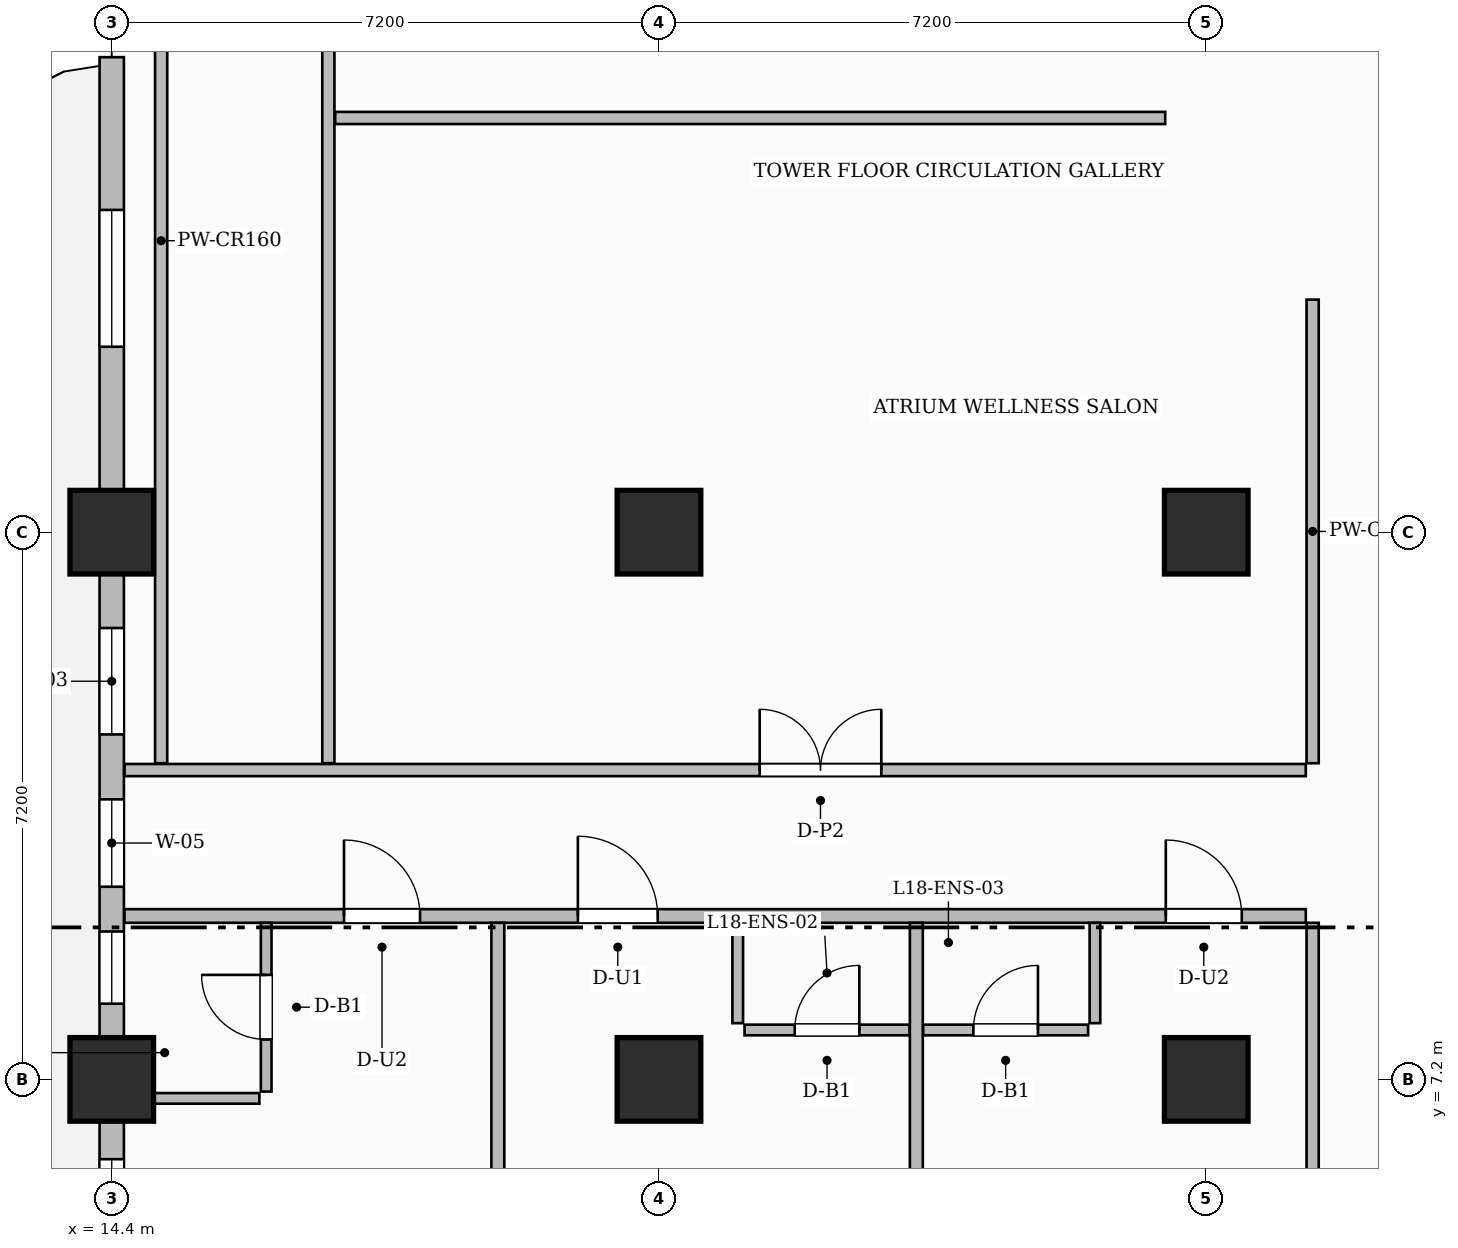
"""IFC4 building model, lengths in metres.
Left out: names, types, materials, properties, quantities, classifications, styles, units other than length and angle.
Written with IfcOpenShell. Run it as: python <this file> out.ifc"""

import sys

from ifc_helpers import new_model, si_unit, direction, frame, frame_2d, origin, origin_2d, place, context, subcontext, project, spatial, rectangle, extrude, source, transform, mapped, element, fill, save


model = new_model("IFC4")
c1 = context("Model", 3, precision=1e-05, world=origin(), true_north=direction((0.0, 1.0)))
c2 = subcontext(c1, "Body", "Model", "MODEL_VIEW")
j1 = project(units=[si_unit("LENGTHUNIT", "METRE"), si_unit("PLANEANGLEUNIT", "RADIAN")], contexts=[c1])
p1 = place(None, origin())
s1 = spatial("IfcSite", under=j1, at=p1, CompositionType="ELEMENT")
p2 = place(p1, origin())
s2 = spatial("IfcBuilding", under=s1, at=p2, CompositionType="ELEMENT")
p3 = place(p2, frame((0.0, 0.0, 76.8)))
s3 = spatial("IfcBuildingStorey", under=s2, at=p3, CompositionType="ELEMENT", Elevation=76.8)
m1 = source(origin(), c2, "Body", "SweptSolid", [
    extrude(rectangle(XDim=1.1, YDim=1.1, at=origin_2d()), origin(), (0.0, 0.0, 1.0), 3.7),
])
for number, where, z_axis, x_axis in (
    (1, (14.4, 7.2, 0.0), (0.0, 0.0, 1.0), (1.0, 0.0, 0.0)),
    (2, (14.4, 14.4, 0.0), (0.0, 0.0, 1.0), (1.0, 0.0, 0.0)),
    (3, (21.6, 7.2, 0.0), (0.0, 0.0, 1.0), (1.0, 0.0, 0.0)),
    (4, (21.6, 14.4, 0.0), (0.0, 0.0, 1.0), (1.0, 0.0, 0.0)),
    (5, (28.8, 7.2, 0.0), (0.0, 0.0, 1.0), (1.0, 0.0, 0.0)),
    (6, (28.8, 14.4, 0.0), (0.0, 0.0, 1.0), (1.0, 0.0, 0.0)),
):
    element("IfcColumn", number, at=place(p3, frame(where, z_axis=z_axis, x_axis=x_axis)), inside=s3, PredefinedType="COLUMN", context=c2, shape_type="MappedRepresentation", body=[
        mapped(m1, transform((0.0, 0.0, 0.0), scale=1.0)),
    ])
p4 = place(p3, frame((14.568, 9.35, 0.0), z_axis=(0.0, 0.0, 1.0), x_axis=(1.0, 0.0, 0.0)))
e7 = element("IfcWall", 7, at=p4, inside=s3, PredefinedType="PARTITIONING", context=c2, shape_type="SweptSolid", body=[
    extrude(rectangle(XDim=15.542, YDim=0.18, at=frame_2d((7.771, 0.0))), origin(), (0.0, 0.0, 1.0), 3.45),
])
p5 = place(p4, frame((2.888, 0.0, 0.0)))
e8 = element("IfcOpeningElement", 8, at=p5, cuts=e7, PredefinedType="OPENING", context=c2, shape_type="SweptSolid", body=[
    extrude(rectangle(XDim=1.0, YDim=2.2, at=frame_2d((0.5, 1.1))), frame((0.0, 0.1, 0.0), z_axis=(0.0, -1.0, 0.0), x_axis=(1.0, 0.0, 0.0)), (0.0, 0.0, 1.0), 0.2),
])
p6 = place(p4, frame((5.965, 0.0, 0.0)))
e9 = element("IfcOpeningElement", 9, at=p6, cuts=e7, PredefinedType="OPENING", context=c2, shape_type="SweptSolid", body=[
    extrude(rectangle(XDim=1.05, YDim=2.25, at=frame_2d((0.525, 1.125))), frame((0.0, 0.1, 0.0), z_axis=(0.0, -1.0, 0.0), x_axis=(1.0, 0.0, 0.0)), (0.0, 0.0, 1.0), 0.2),
])
p7 = place(p4, frame((13.7, 0.0, 0.0)))
e10 = element("IfcOpeningElement", 10, at=p7, cuts=e7, PredefinedType="OPENING", context=c2, shape_type="SweptSolid", body=[
    extrude(rectangle(XDim=1.0, YDim=2.2, at=frame_2d((0.5, 1.1))), frame((0.0, 0.1, 0.0), z_axis=(0.0, -1.0, 0.0), x_axis=(1.0, 0.0, 0.0)), (0.0, 0.0, 1.0), 0.2),
])
p8 = place(p3, frame((14.568, 11.27, 0.0), z_axis=(0.0, 0.0, 1.0), x_axis=(1.0, 0.0, 0.0)))
e11 = element("IfcWall", 11, at=p8, inside=s3, PredefinedType="PARTITIONING", context=c2, shape_type="SweptSolid", body=[
    extrude(rectangle(XDim=15.542, YDim=0.16, at=frame_2d((7.771, 0.0))), origin(), (0.0, 0.0, 1.0), 3.45),
])
p9 = place(p8, frame((8.357, 0.0, 0.0)))
e12 = element("IfcOpeningElement", 12, at=p9, cuts=e11, PredefinedType="OPENING", context=c2, shape_type="SweptSolid", body=[
    extrude(rectangle(XDim=1.6, YDim=2.4, at=frame_2d((0.8, 1.2))), frame((0.0, 0.09, 0.0), z_axis=(0.0, -1.0, 0.0), x_axis=(1.0, 0.0, 0.0)), (0.0, 0.0, 1.0), 0.18),
])
p10 = place(p3, frame((30.2, 11.36, 0.0), z_axis=(0.0, 0.0, 1.0), x_axis=(0.0, 1.0, 0.0)))
e13 = element("IfcWall", 13, at=p10, inside=s3, PredefinedType="PARTITIONING", context=c2, shape_type="SweptSolid", body=[
    extrude(rectangle(XDim=6.1, YDim=0.16, at=frame_2d((3.05, 0.0))), origin(), (0.0, 0.0, 1.0), 3.45),
])
p11 = place(p3, frame((30.2, 0.168, 0.0), z_axis=(0.0, 0.0, 1.0), x_axis=(0.0, 1.0, 0.0)))
e14 = element("IfcWall", 14, at=p11, inside=s3, PredefinedType="PARTITIONING", context=c2, shape_type="SweptSolid", body=[
    extrude(rectangle(XDim=9.092, YDim=0.16, at=frame_2d((4.546, 0.0))), origin(), (0.0, 0.0, 1.0), 3.45),
])
p12 = place(p11, frame((1.957, 0.0, 0.0)))
e15 = element("IfcOpeningElement", 15, at=p12, cuts=e14, PredefinedType="OPENING", context=c2, shape_type="SweptSolid", body=[
    extrude(rectangle(XDim=1.05, YDim=2.15, at=frame_2d((0.525, 1.075))), frame((0.0, 0.09, 0.0), z_axis=(0.0, -1.0, 0.0), x_axis=(1.0, 0.0, 0.0)), (0.0, 0.0, 1.0), 0.18),
])
p13 = place(p3, frame((19.48, 0.168, 0.0), z_axis=(0.0, 0.0, 1.0), x_axis=(0.0, 1.0, 0.0)))
e16 = element("IfcWall", 16, at=p13, inside=s3, PredefinedType="PARTITIONING", context=c2, shape_type="SweptSolid", body=[
    extrude(rectangle(XDim=9.092, YDim=0.17, at=frame_2d((4.546, 0.0))), origin(), (0.0, 0.0, 1.0), 3.45),
])
p14 = place(p3, frame((24.986, 0.168, 0.0), z_axis=(0.0, 0.0, 1.0), x_axis=(0.0, 1.0, 0.0)))
e17 = element("IfcWall", 17, at=p14, inside=s3, PredefinedType="PARTITIONING", context=c2, shape_type="SweptSolid", body=[
    extrude(rectangle(XDim=9.092, YDim=0.17, at=frame_2d((4.546, 0.0))), origin(), (0.0, 0.0, 1.0), 3.075),
])
p15 = place(p3, frame((16.432, 7.04, 0.0), z_axis=(0.0, 0.0, 1.0), x_axis=(0.0, 1.0, 0.0)))
e18 = element("IfcWall", 18, at=p15, inside=s3, PredefinedType="PARTITIONING", context=c2, shape_type="SweptSolid", body=[
    extrude(rectangle(XDim=2.22, YDim=0.14, at=frame_2d((1.11, 0.0))), origin(), (0.0, 0.0, 1.0), 3.45),
])
p16 = place(p15, frame((0.685, 0.0, 0.0)))
e19 = element("IfcOpeningElement", 19, at=p16, cuts=e18, PredefinedType="OPENING", context=c2, shape_type="SweptSolid", body=[
    extrude(rectangle(XDim=0.85, YDim=2.1, at=frame_2d((0.425, 1.05))), frame((0.0, 0.08, 0.0), z_axis=(0.0, -1.0, 0.0), x_axis=(1.0, 0.0, 0.0)), (0.0, 0.0, 1.0), 0.16),
])
p17 = place(p3, frame((14.49, 6.95, 0.0), z_axis=(0.0, 0.0, 1.0), x_axis=(1.0, 0.0, 0.0)))
e20 = element("IfcWall", 20, at=p17, inside=s3, PredefinedType="PARTITIONING", context=c2, shape_type="SweptSolid", body=[
    extrude(rectangle(XDim=1.852, YDim=0.14, at=frame_2d((0.926, 0.0))), origin(), (0.0, 0.0, 1.0), 2.885),
])
p18 = place(p3, frame((22.636, 7.94, 0.0), z_axis=(0.0, 0.0, 1.0), x_axis=(0.0, 1.0, 0.0)))
e21 = element("IfcWall", 21, at=p18, inside=s3, PredefinedType="PARTITIONING", context=c2, shape_type="SweptSolid", body=[
    extrude(rectangle(XDim=1.32, YDim=0.14, at=frame_2d((0.66, 0.0))), origin(), (0.0, 0.0, 1.0), 3.45),
])
p19 = place(p3, frame((22.726, 7.85, 0.0), z_axis=(0.0, 0.0, 1.0), x_axis=(1.0, 0.0, 0.0)))
e22 = element("IfcWall", 22, at=p19, inside=s3, PredefinedType="PARTITIONING", context=c2, shape_type="SweptSolid", body=[
    extrude(rectangle(XDim=2.17, YDim=0.14, at=frame_2d((1.085, 0.0))), origin(), (0.0, 0.0, 1.0), 3.45),
])
p20 = place(p19, frame((0.66, 0.0, 0.0)))
e23 = element("IfcOpeningElement", 23, at=p20, cuts=e22, PredefinedType="OPENING", context=c2, shape_type="SweptSolid", body=[
    extrude(rectangle(XDim=0.85, YDim=2.1, at=frame_2d((0.425, 1.05))), frame((0.0, 0.08, 0.0), z_axis=(0.0, -1.0, 0.0), x_axis=(1.0, 0.0, 0.0)), (0.0, 0.0, 1.0), 0.16),
])
p21 = place(p3, frame((27.336, 7.94, 0.0), z_axis=(0.0, 0.0, 1.0), x_axis=(0.0, 1.0, 0.0)))
e24 = element("IfcWall", 24, at=p21, inside=s3, PredefinedType="PARTITIONING", context=c2, shape_type="SweptSolid", body=[
    extrude(rectangle(XDim=1.32, YDim=0.14, at=frame_2d((0.66, 0.0))), origin(), (0.0, 0.0, 1.0), 3.45),
])
p22 = place(p3, frame((25.076, 7.85, 0.0), z_axis=(0.0, 0.0, 1.0), x_axis=(1.0, 0.0, 0.0)))
e25 = element("IfcWall", 25, at=p22, inside=s3, PredefinedType="PARTITIONING", context=c2, shape_type="SweptSolid", body=[
    extrude(rectangle(XDim=2.17, YDim=0.14, at=frame_2d((1.085, 0.0))), origin(), (0.0, 0.0, 1.0), 3.45),
])
p23 = place(p22, frame((0.66, 0.0, 0.0)))
e26 = element("IfcOpeningElement", 26, at=p23, cuts=e25, PredefinedType="OPENING", context=c2, shape_type="SweptSolid", body=[
    extrude(rectangle(XDim=0.85, YDim=2.1, at=frame_2d((0.425, 1.05))), frame((0.0, 0.08, 0.0), z_axis=(0.0, -1.0, 0.0), x_axis=(1.0, 0.0, 0.0)), (0.0, 0.0, 1.0), 0.16),
])
for number, where, z_axis, x_axis in (
    (27, (15.05, 11.36, 0.0), (0.0, 0.0, 1.0), (0.0, 1.0, 0.0)),
    (28, (17.25, 11.36, 0.0), (0.0, 0.0, 1.0), (0.0, 1.0, 0.0)),
):
    element("IfcWall", number, at=place(p3, frame(where, z_axis=z_axis, x_axis=x_axis)), inside=s3, PredefinedType="PARTITIONING", context=c2, shape_type="SweptSolid", body=[
        extrude(rectangle(XDim=13.75, YDim=0.16, at=frame_2d((6.875, 0.0))), origin(), (0.0, 0.0, 1.0), 3.45),
    ])
p24 = place(p3, frame((17.34, 19.85, 0.0), z_axis=(0.0, 0.0, 1.0), x_axis=(1.0, 0.0, 0.0)))
e29 = element("IfcWall", 29, at=p24, inside=s3, PredefinedType="PARTITIONING", context=c2, shape_type="SweptSolid", body=[
    extrude(rectangle(XDim=10.92, YDim=0.16, at=frame_2d((5.46, 0.0))), origin(), (0.0, 0.0, 1.0), 3.45),
])
p25 = place(p3, frame((14.4, 0.05, 0.0), z_axis=(0.0, 0.0, 1.0), x_axis=(0.0, 1.0, 0.0)))
e30 = element("IfcWall", 30, at=p25, inside=s3, PredefinedType="SOLIDWALL", context=c2, shape_type="SweptSolid", body=[
    extrude(rectangle(XDim=20.6, YDim=0.32, at=frame_2d((10.3, 0.0))), origin(), (0.0, 0.0, 1.0), 2.885),
])
p26 = place(p25, frame((3.4, 0.0, 0.0)))
e31 = element("IfcOpeningElement", 31, at=p26, cuts=e30, PredefinedType="OPENING", context=c2, shape_type="SweptSolid", body=[
    extrude(rectangle(XDim=1.2, YDim=2.2, at=frame_2d((0.6, 1.1))), frame((0.0, 0.17, 0.0), z_axis=(0.0, -1.0, 0.0), x_axis=(1.0, 0.0, 0.0)), (0.0, 0.0, 1.0), 0.34),
])
p27 = place(p25, frame((1.225, 0.0, 0.8)))
e32 = element("IfcOpeningElement", 32, at=p27, cuts=e30, PredefinedType="OPENING", context=c2, shape_type="SweptSolid", body=[
    extrude(rectangle(XDim=1.4, YDim=1.85, at=frame_2d((0.7, 0.925))), frame((0.0, 0.17, 0.0), z_axis=(0.0, -1.0, 0.0), x_axis=(1.0, 0.0, 0.0)), (0.0, 0.0, 1.0), 0.34),
])
p28 = place(p25, frame((5.15, 0.0, 0.8)))
e33 = element("IfcOpeningElement", 33, at=p28, cuts=e30, PredefinedType="OPENING", context=c2, shape_type="SweptSolid", body=[
    extrude(rectangle(XDim=0.95, YDim=1.75, at=frame_2d((0.475, 0.875))), frame((0.0, 0.17, 0.0), z_axis=(0.0, -1.0, 0.0), x_axis=(1.0, 0.0, 0.0)), (0.0, 0.0, 1.0), 0.34),
])
p29 = place(p25, frame((8.146, 0.0, 0.8)))
e34 = element("IfcOpeningElement", 34, at=p29, cuts=e30, PredefinedType="OPENING", context=c2, shape_type="SweptSolid", body=[
    extrude(rectangle(XDim=0.95, YDim=1.75, at=frame_2d((0.475, 0.875))), frame((0.0, 0.17, 0.0), z_axis=(0.0, -1.0, 0.0), x_axis=(1.0, 0.0, 0.0)), (0.0, 0.0, 1.0), 0.34),
])
p30 = place(p25, frame((9.685, 0.0, 0.8)))
e35 = element("IfcOpeningElement", 35, at=p30, cuts=e30, PredefinedType="OPENING", context=c2, shape_type="SweptSolid", body=[
    extrude(rectangle(XDim=1.15, YDim=1.8, at=frame_2d((0.575, 0.9))), frame((0.0, 0.17, 0.0), z_axis=(0.0, -1.0, 0.0), x_axis=(1.0, 0.0, 0.0)), (0.0, 0.0, 1.0), 0.34),
])
p31 = place(p25, frame((11.689, 0.0, 0.8)))
e36 = element("IfcOpeningElement", 36, at=p31, cuts=e30, PredefinedType="OPENING", context=c2, shape_type="SweptSolid", body=[
    extrude(rectangle(XDim=1.4, YDim=1.85, at=frame_2d((0.7, 0.925))), frame((0.0, 0.17, 0.0), z_axis=(0.0, -1.0, 0.0), x_axis=(1.0, 0.0, 0.0)), (0.0, 0.0, 1.0), 0.34),
])
p32 = place(p25, frame((16.79, 0.0, 0.8)))
e37 = element("IfcOpeningElement", 37, at=p32, cuts=e30, PredefinedType="OPENING", context=c2, shape_type="SweptSolid", body=[
    extrude(rectangle(XDim=1.8, YDim=1.85, at=frame_2d((0.9, 0.925))), frame((0.0, 0.17, 0.0), z_axis=(0.0, -1.0, 0.0), x_axis=(1.0, 0.0, 0.0)), (0.0, 0.0, 1.0), 0.34),
])
m2 = source(origin(), c2, "Body", "SweptSolid", [
    extrude(rectangle(XDim=0.85, YDim=2.1, at=frame_2d((0.425, 1.05))), frame((0.0, 0.025, 0.0), z_axis=(0.0, -1.0, 0.0), x_axis=(1.0, 0.0, 0.0)), (0.0, 0.0, 1.0), 0.05),
])
p33 = place(p16, origin())
e38 = element("IfcDoor", 38, at=p33, inside=s3, OperationType="SINGLE_SWING_RIGHT", PredefinedType="DOOR", context=c2, shape_type="MappedRepresentation", body=[
    mapped(m2, transform((0.0, 0.0, 0.0), scale=1.0)),
])
fill(e19, e38)
m3 = source(origin(), c2, "Body", "SweptSolid", [
    extrude(rectangle(XDim=1.0, YDim=2.2, at=frame_2d((0.5, 1.1))), frame((0.0, 0.025, 0.0), z_axis=(0.0, -1.0, 0.0), x_axis=(1.0, 0.0, 0.0)), (0.0, 0.0, 1.0), 0.05),
])
p34 = place(p5, origin())
e39 = element("IfcDoor", 39, at=p34, inside=s3, OperationType="SINGLE_SWING_LEFT", PredefinedType="DOOR", context=c2, shape_type="MappedRepresentation", body=[
    mapped(m3, transform((0.0, 0.0, 0.0), scale=1.0)),
])
fill(e8, e39)
p35 = place(p20, origin())
e40 = element("IfcDoor", 40, at=p35, inside=s3, OperationType="SINGLE_SWING_RIGHT", PredefinedType="DOOR", context=c2, shape_type="MappedRepresentation", body=[
    mapped(m2, transform((0.0, 0.0, 0.0), scale=1.0)),
])
fill(e23, e40)
m4 = source(origin(), c2, "Body", "SweptSolid", [
    extrude(rectangle(XDim=1.05, YDim=2.25, at=frame_2d((0.525, 1.125))), frame((0.0, 0.025, 0.0), z_axis=(0.0, -1.0, 0.0), x_axis=(1.0, 0.0, 0.0)), (0.0, 0.0, 1.0), 0.05),
])
p36 = place(p6, origin())
e41 = element("IfcDoor", 41, at=p36, inside=s3, OperationType="SINGLE_SWING_LEFT", PredefinedType="DOOR", context=c2, shape_type="MappedRepresentation", body=[
    mapped(m4, transform((0.0, 0.0, 0.0), scale=1.0)),
])
fill(e9, e41)
p37 = place(p23, origin())
e42 = element("IfcDoor", 42, at=p37, inside=s3, OperationType="SINGLE_SWING_RIGHT", PredefinedType="DOOR", context=c2, shape_type="MappedRepresentation", body=[
    mapped(m2, transform((0.0, 0.0, 0.0), scale=1.0)),
])
fill(e26, e42)
p38 = place(p7, origin())
e43 = element("IfcDoor", 43, at=p38, inside=s3, OperationType="SINGLE_SWING_LEFT", PredefinedType="DOOR", context=c2, shape_type="MappedRepresentation", body=[
    mapped(m3, transform((0.0, 0.0, 0.0), scale=1.0)),
])
fill(e10, e43)
m5 = source(origin(), c2, "Body", "SweptSolid", [
    extrude(rectangle(XDim=1.6, YDim=2.4, at=frame_2d((0.8, 1.2))), frame((0.0, 0.025, 0.0), z_axis=(0.0, -1.0, 0.0), x_axis=(1.0, 0.0, 0.0)), (0.0, 0.0, 1.0), 0.05),
])
p39 = place(p9, origin())
e44 = element("IfcDoor", 44, at=p39, inside=s3, OperationType="DOUBLE_DOOR_SINGLE_SWING", PredefinedType="DOOR", context=c2, shape_type="MappedRepresentation", body=[
    mapped(m5, transform((0.0, 0.0, 0.0), scale=1.0)),
])
fill(e12, e44)
m6 = source(origin(), c2, "Body", "SweptSolid", [
    extrude(rectangle(XDim=0.95, YDim=1.75, at=frame_2d((0.475, 0.875))), frame((0.0, 0.03, 0.0), z_axis=(0.0, -1.0, 0.0), x_axis=(1.0, 0.0, 0.0)), (0.0, 0.0, 1.0), 0.06),
])
p40 = place(p28, origin())
e45 = element("IfcWindow", 45, at=p40, inside=s3, PartitioningType="SINGLE_PANEL", PredefinedType="WINDOW", context=c2, shape_type="MappedRepresentation", body=[
    mapped(m6, transform((0.0, 0.0, 0.0), scale=1.0)),
])
fill(e33, e45)
p41 = place(p29, origin())
e46 = element("IfcWindow", 46, at=p41, inside=s3, PartitioningType="SINGLE_PANEL", PredefinedType="WINDOW", context=c2, shape_type="MappedRepresentation", body=[
    mapped(m6, transform((0.0, 0.0, 0.0), scale=1.0)),
])
fill(e34, e46)
m7 = source(origin(), c2, "Body", "SweptSolid", [
    extrude(rectangle(XDim=1.15, YDim=1.8, at=frame_2d((0.575, 0.9))), frame((0.0, 0.03, 0.0), z_axis=(0.0, -1.0, 0.0), x_axis=(1.0, 0.0, 0.0)), (0.0, 0.0, 1.0), 0.06),
])
p42 = place(p30, origin())
e47 = element("IfcWindow", 47, at=p42, inside=s3, PartitioningType="SINGLE_PANEL", PredefinedType="WINDOW", context=c2, shape_type="MappedRepresentation", body=[
    mapped(m7, transform((0.0, 0.0, 0.0), scale=1.0)),
])
fill(e35, e47)
m8 = source(origin(), c2, "Body", "SweptSolid", [
    extrude(rectangle(XDim=1.4, YDim=1.85, at=frame_2d((0.7, 0.925))), frame((0.0, 0.03, 0.0), z_axis=(0.0, -1.0, 0.0), x_axis=(1.0, 0.0, 0.0)), (0.0, 0.0, 1.0), 0.06),
])
p43 = place(p31, origin())
e48 = element("IfcWindow", 48, at=p43, inside=s3, PartitioningType="SINGLE_PANEL", PredefinedType="WINDOW", context=c2, shape_type="MappedRepresentation", body=[
    mapped(m8, transform((0.0, 0.0, 0.0), scale=1.0)),
])
fill(e36, e48)
m9 = source(origin(), c2, "Body", "SweptSolid", [
    extrude(rectangle(XDim=1.8, YDim=1.85, at=frame_2d((0.9, 0.925))), frame((0.0, 0.03, 0.0), z_axis=(0.0, -1.0, 0.0), x_axis=(1.0, 0.0, 0.0)), (0.0, 0.0, 1.0), 0.06),
])
p44 = place(p32, origin())
e49 = element("IfcWindow", 49, at=p44, inside=s3, PartitioningType="DOUBLE_PANEL_VERTICAL", PredefinedType="WINDOW", context=c2, shape_type="MappedRepresentation", body=[
    mapped(m9, transform((0.0, 0.0, 0.0), scale=1.0)),
])
fill(e37, e49)
save(model, sys.argv[1])
